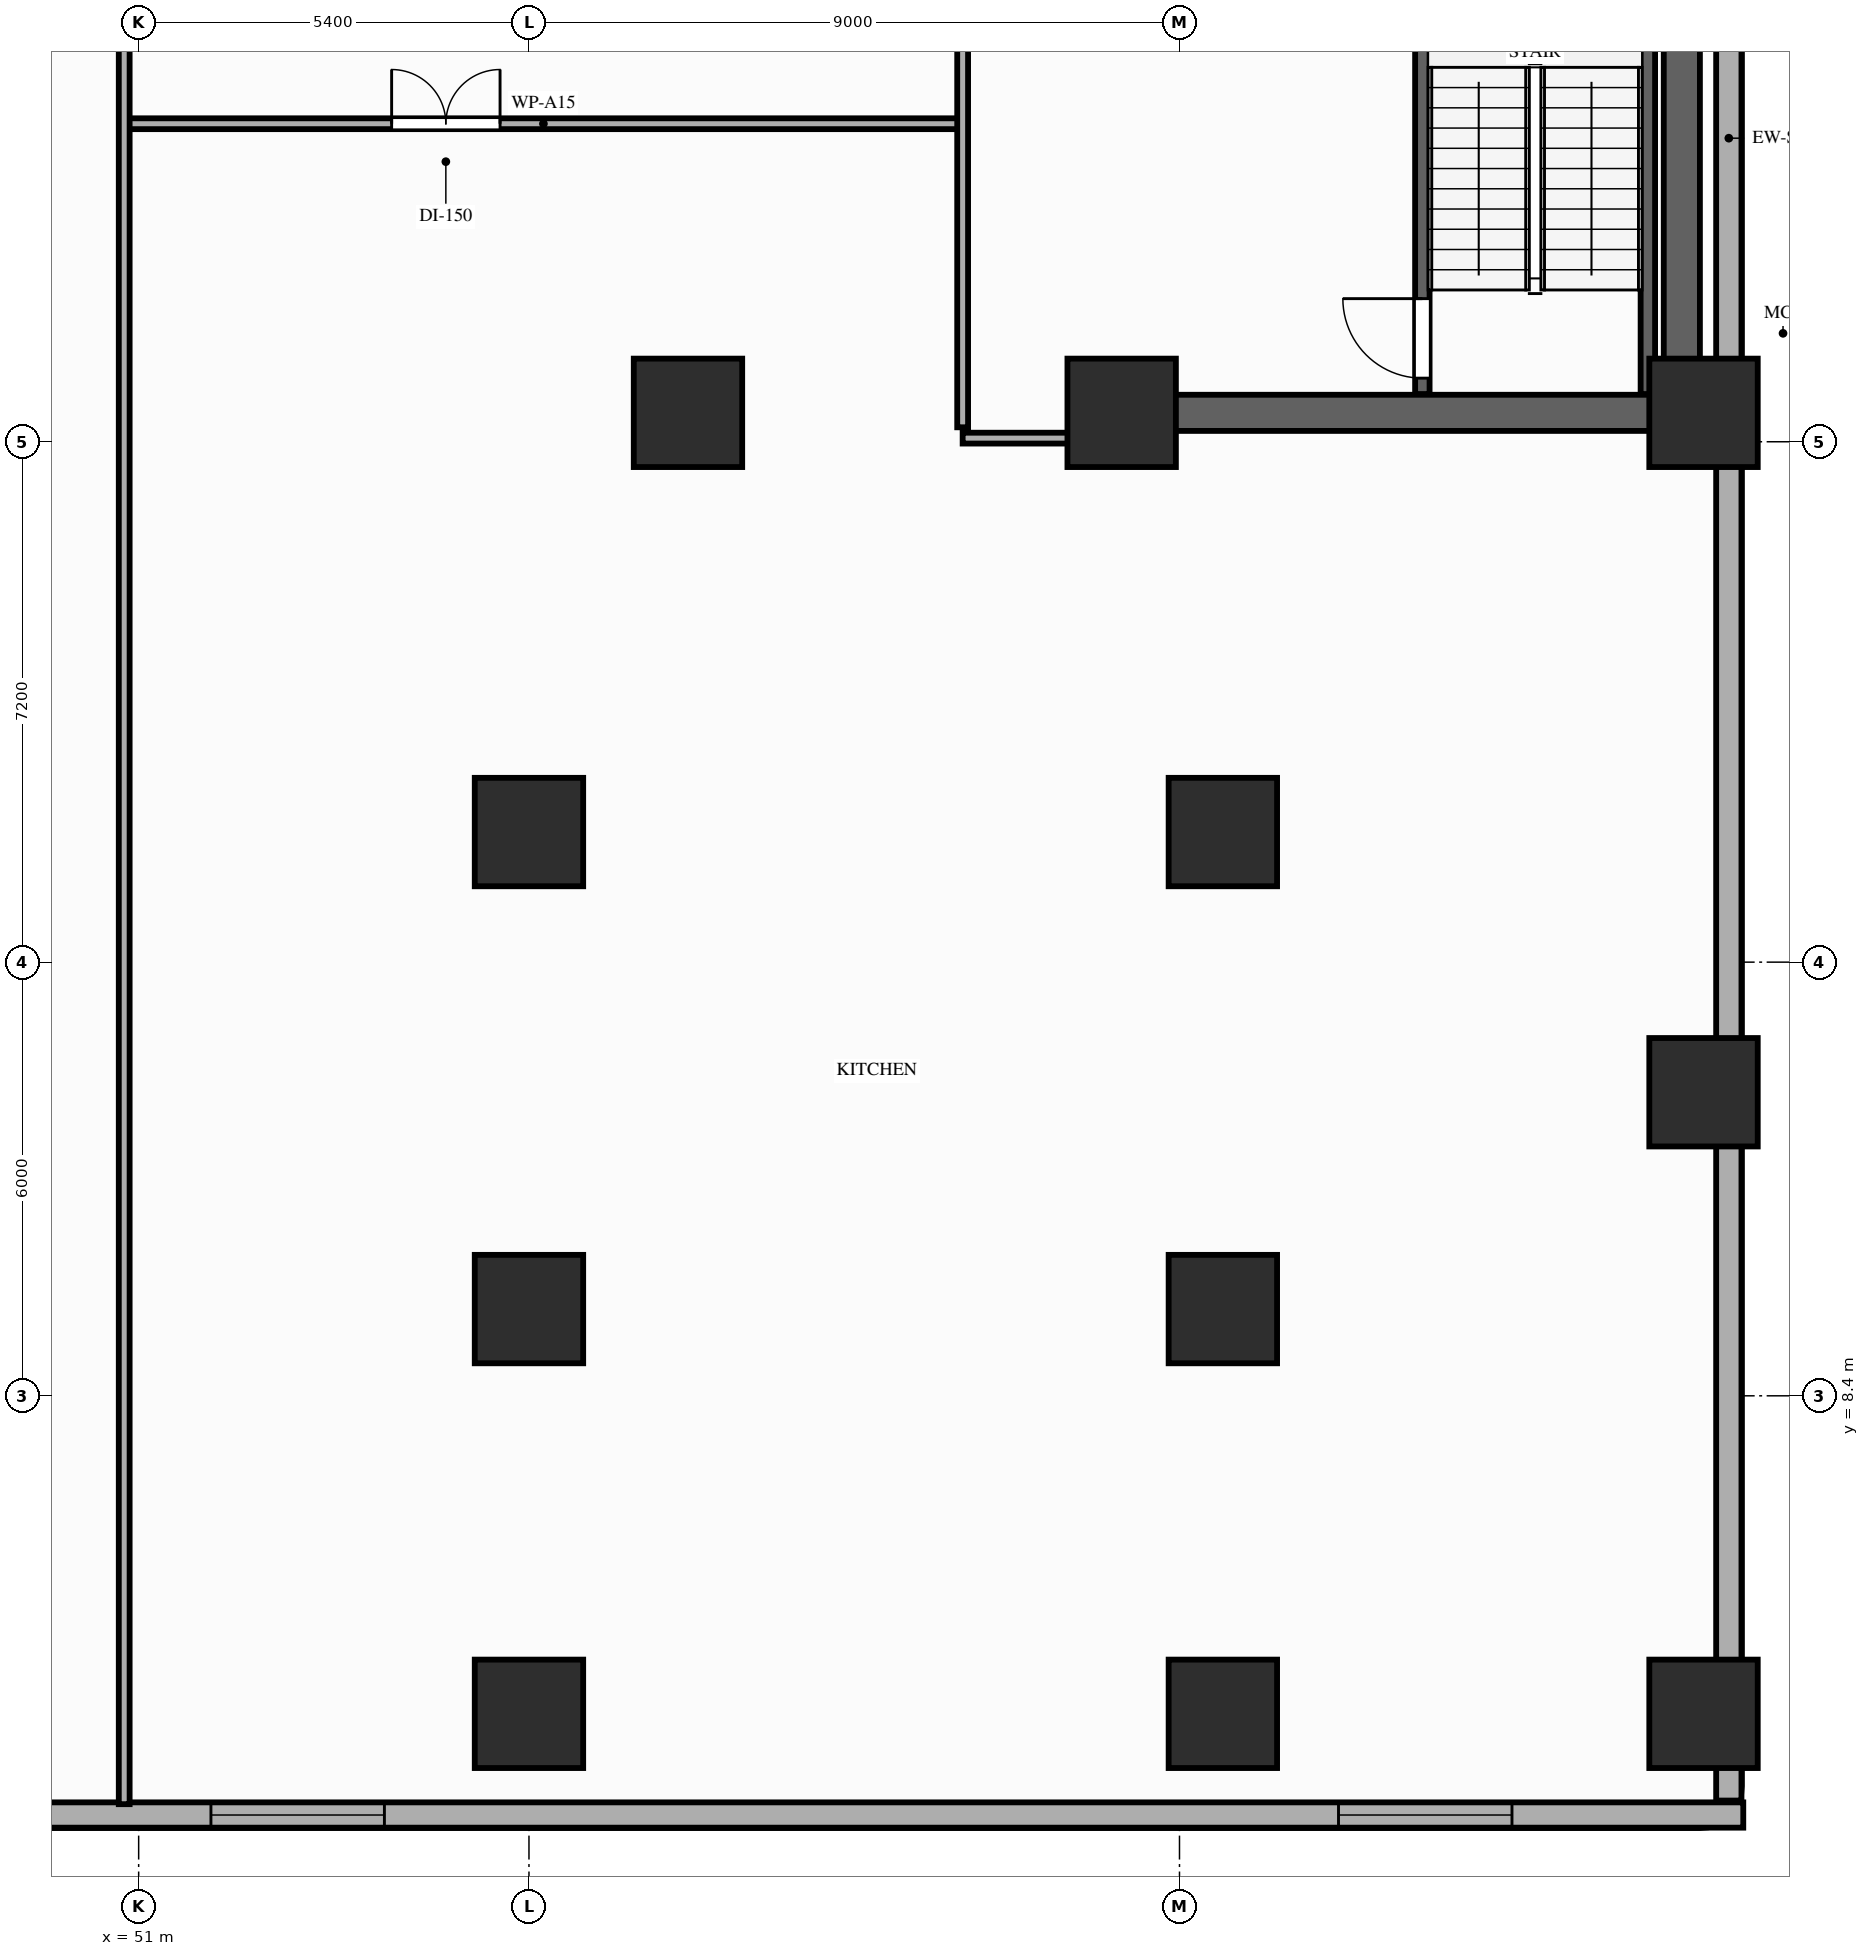
"""IFC4 building model, lengths in metres.
Left out: names, types, materials, properties, quantities, classifications, styles, units other than length and angle.
Written with IfcOpenShell. Run it as: python <this file> out.ifc"""

import sys

from ifc_helpers import new_model, si_unit, direction, frame, frame_2d, origin, origin_2d, place, context, subcontext, project, spatial, rectangle, extrude, element, fill, save


model = new_model("IFC4")
c1 = context("Model", 3, precision=1e-05, world=origin(), true_north=direction((0.0, 1.0)))
c2 = subcontext(c1, "Body", "Model", "MODEL_VIEW")
j1 = project(units=[si_unit("LENGTHUNIT", "METRE"), si_unit("PLANEANGLEUNIT", "RADIAN")], contexts=[c1])
p1 = place(None, origin())
s1 = spatial("IfcSite", under=j1, at=p1, CompositionType="ELEMENT")
p2 = place(p1, origin())
s2 = spatial("IfcBuilding", under=s1, at=p2, CompositionType="ELEMENT")
p3 = place(p2, frame((0.0, 0.0, 17.6)))
s3 = spatial("IfcBuildingStorey", under=s2, at=p3, CompositionType="ELEMENT", Elevation=17.6)
for number, where, z_axis, x_axis in (
    (1, (64.6, 22.0, 0.0), (0.0, 0.0, 1.0), (1.0, 0.0, 0.0)),
    (2, (72.65, 22.0, 0.0), (0.0, 0.0, 1.0), (1.0, 0.0, 0.0)),
    (3, (58.6, 22.0, 0.0), (0.0, 0.0, 1.0), (1.0, 0.0, 0.0)),
    (4, (56.4, 9.6, 0.0), (0.0, 0.0, 1.0), (1.0, 0.0, 0.0)),
    (5, (66.0, 9.6, 0.0), (0.0, 0.0, 1.0), (1.0, 0.0, 0.0)),
    (6, (56.4, 16.2, 0.0), (0.0, 0.0, 1.0), (1.0, 0.0, 0.0)),
    (7, (66.0, 16.2, 0.0), (0.0, 0.0, 1.0), (1.0, 0.0, 0.0)),
    (8, (56.4, 4.0, 0.0), (0.0, 0.0, 1.0), (1.0, 0.0, 0.0)),
    (9, (66.0, 4.0, 0.0), (0.0, 0.0, 1.0), (1.0, 0.0, 0.0)),
    (10, (72.65, 4.0, 0.0), (0.0, 0.0, 1.0), (1.0, 0.0, 0.0)),
    (11, (72.65, 12.6, 0.0), (0.0, 0.0, 1.0), (1.0, 0.0, 0.0)),
):
    element("IfcColumn", number, at=place(p3, frame(where, z_axis=z_axis, x_axis=x_axis)), inside=s3, PredefinedType="COLUMN", context=c2, shape_type="SweptSolid", body=[
        extrude(rectangle(XDim=1.5, YDim=1.5, at=origin_2d()), origin(), (0.0, 0.0, 1.0), 4.2),
    ])
p4 = place(p3, frame((3.6, 2.6, 0.0), z_axis=(0.0, 0.0, 1.0), x_axis=(1.0, 0.0, 0.0)))
e12 = element("IfcWall", 12, at=p4, inside=s3, PredefinedType="STANDARD", context=c2, shape_type="SweptSolid", body=[
    extrude(rectangle(XDim=69.6, YDim=0.35, at=frame_2d((34.8, 0.0))), origin(), (0.0, 0.0, 1.0), 3.9),
])
p5 = place(p4, frame((17.2, 0.0, 0.9)))
e13 = element("IfcOpeningElement", 13, at=p5, cuts=e12, PredefinedType="OPENING", context=c2, shape_type="SweptSolid", body=[
    extrude(rectangle(XDim=2.4, YDim=2.15, at=frame_2d((1.2, 1.075))), frame((0.0, 0.185, 0.0), z_axis=(0.0, -1.0, 0.0), x_axis=(1.0, 0.0, 0.0)), (0.0, 0.0, 1.0), 0.37),
])
p6 = place(p4, frame((24.6, 0.0, 0.9)))
e14 = element("IfcOpeningElement", 14, at=p6, cuts=e12, PredefinedType="OPENING", context=c2, shape_type="SweptSolid", body=[
    extrude(rectangle(XDim=2.4, YDim=2.15, at=frame_2d((1.2, 1.075))), frame((0.0, 0.185, 0.0), z_axis=(0.0, -1.0, 0.0), x_axis=(1.0, 0.0, 0.0)), (0.0, 0.0, 1.0), 0.37),
])
p7 = place(p4, frame((36.2, 0.0, 0.9)))
e15 = element("IfcOpeningElement", 15, at=p7, cuts=e12, PredefinedType="OPENING", context=c2, shape_type="SweptSolid", body=[
    extrude(rectangle(XDim=2.4, YDim=2.15, at=frame_2d((1.2, 1.075))), frame((0.0, 0.185, 0.0), z_axis=(0.0, -1.0, 0.0), x_axis=(1.0, 0.0, 0.0)), (0.0, 0.0, 1.0), 0.37),
])
p8 = place(p4, frame((48.4, 0.0, 0.9)))
e16 = element("IfcOpeningElement", 16, at=p8, cuts=e12, PredefinedType="OPENING", context=c2, shape_type="SweptSolid", body=[
    extrude(rectangle(XDim=2.4, YDim=2.15, at=frame_2d((1.2, 1.075))), frame((0.0, 0.185, 0.0), z_axis=(0.0, -1.0, 0.0), x_axis=(1.0, 0.0, 0.0)), (0.0, 0.0, 1.0), 0.37),
])
p9 = place(p4, frame((64.0, 0.0, 0.9)))
e17 = element("IfcOpeningElement", 17, at=p9, cuts=e12, PredefinedType="OPENING", context=c2, shape_type="SweptSolid", body=[
    extrude(rectangle(XDim=2.4, YDim=2.15, at=frame_2d((1.2, 1.075))), frame((0.0, 0.185, 0.0), z_axis=(0.0, -1.0, 0.0), x_axis=(1.0, 0.0, 0.0)), (0.0, 0.0, 1.0), 0.37),
])
p10 = place(p3, frame((73.0, 2.8, 0.0), z_axis=(0.0, 0.0, 1.0), x_axis=(0.0, 1.0, 0.0)))
e18 = element("IfcWall", 18, at=p10, inside=s3, PredefinedType="STANDARD", context=c2, shape_type="SweptSolid", body=[
    extrude(rectangle(XDim=46.0, YDim=0.35, at=frame_2d((23.0, 0.0))), origin(), (0.0, 0.0, 1.0), 3.9),
])
p11 = place(p3, frame((72.35, 22.0, 0.0), z_axis=(0.0, 0.0, 1.0), x_axis=(0.0, 1.0, 0.0)))
e19 = element("IfcWall", 19, at=p11, inside=s3, PredefinedType="SHEAR", context=c2, shape_type="SweptSolid", body=[
    extrude(rectangle(XDim=20.25, YDim=0.5, at=frame_2d((10.125, 0.0))), origin(), (0.0, 0.0, 1.0), 3.9),
])
p12 = place(p3, frame((64.6, 22.0, 0.0), z_axis=(0.0, 0.0, 1.0), x_axis=(1.0, 0.0, 0.0)))
e20 = element("IfcWall", 20, at=p12, inside=s3, PredefinedType="SHEAR", context=c2, shape_type="SweptSolid", body=[
    extrude(rectangle(XDim=7.5, YDim=0.5, at=frame_2d((3.75, 0.0))), origin(), (0.0, 0.0, 1.0), 3.9),
])
p13 = place(p3, frame((68.76, 22.26, 0.0), z_axis=(0.0, 0.0, 1.0), x_axis=(0.0, 1.0, 0.0)))
e21 = element("IfcWall", 21, at=p13, inside=s3, PredefinedType="SHEAR", context=c2, shape_type="SweptSolid", body=[
    extrude(rectangle(XDim=7.82, YDim=0.2, at=frame_2d((3.91, 0.0))), origin(), (0.0, 0.0, 1.0), 3.9),
])
p14 = place(p13, frame((0.22, 0.0, 0.0)))
e22 = element("IfcOpeningElement", 22, at=p14, cuts=e21, PredefinedType="OPENING", context=c2, shape_type="SweptSolid", body=[
    extrude(rectangle(XDim=1.1, YDim=2.15, at=frame_2d((0.55, 1.075))), frame((0.0, 0.11, 0.0), z_axis=(0.0, -1.0, 0.0), x_axis=(1.0, 0.0, 0.0)), (0.0, 0.0, 1.0), 0.22),
])
p15 = place(p3, frame((71.88, 22.26, 0.0), z_axis=(0.0, 0.0, 1.0), x_axis=(0.0, 1.0, 0.0)))
e23 = element("IfcWall", 23, at=p15, inside=s3, PredefinedType="SHEAR", context=c2, shape_type="SweptSolid", body=[
    extrude(rectangle(XDim=7.82, YDim=0.2, at=frame_2d((3.91, 0.0))), origin(), (0.0, 0.0, 1.0), 3.9),
])
p16 = place(p3, frame((50.8, 26.0, 0.0), z_axis=(0.0, 0.0, 1.0), x_axis=(1.0, 0.0, 0.0)))
e24 = element("IfcWall", 24, at=p16, inside=s3, PredefinedType="PARTITIONING", context=c2, shape_type="SweptSolid", body=[
    extrude(rectangle(XDim=11.6, YDim=0.15, at=frame_2d((5.8, 0.0))), origin(), (0.0, 0.0, 1.0), 3.18),
])
p17 = place(p16, frame((3.7, 0.0, 0.0)))
e25 = element("IfcOpeningElement", 25, at=p17, cuts=e24, PredefinedType="OPENING", context=c2, shape_type="SweptSolid", body=[
    extrude(rectangle(XDim=1.5, YDim=2.18, at=frame_2d((0.75, 1.09))), frame((0.0, 0.085, 0.0), z_axis=(0.0, -1.0, 0.0), x_axis=(1.0, 0.0, 0.0)), (0.0, 0.0, 1.0), 0.17),
])
p18 = place(p3, frame((50.8, 2.75, 0.0), z_axis=(0.0, 0.0, 1.0), x_axis=(0.0, 1.0, 0.0)))
e26 = element("IfcWall", 26, at=p18, inside=s3, PredefinedType="PARTITIONING", context=c2, shape_type="SweptSolid", body=[
    extrude(rectangle(XDim=24.85, YDim=0.15, at=frame_2d((12.425, 0.0))), origin(), (0.0, 0.0, 1.0), 3.9),
])
p19 = place(p3, frame((62.4, 21.8, 0.0), z_axis=(0.0, 0.0, 1.0), x_axis=(0.0, 1.0, 0.0)))
e27 = element("IfcWall", 27, at=p19, inside=s3, PredefinedType="PARTITIONING", context=c2, shape_type="SweptSolid", body=[
    extrude(rectangle(XDim=27.05, YDim=0.15, at=frame_2d((13.525, 0.0))), origin(), (0.0, 0.0, 1.0), 3.18),
])
p20 = place(p19, frame((6.2, 0.0, 0.0)))
e28 = element("IfcOpeningElement", 28, at=p20, cuts=e27, PredefinedType="OPENING", context=c2, shape_type="SweptSolid", body=[
    extrude(rectangle(XDim=1.1, YDim=2.15, at=frame_2d((0.55, 1.075))), frame((0.0, 0.085, 0.0), z_axis=(0.0, -1.0, 0.0), x_axis=(1.0, 0.0, 0.0)), (0.0, 0.0, 1.0), 0.17),
])
p21 = place(p3, frame((62.4, 21.65, 0.0), z_axis=(0.0, 0.0, 1.0), x_axis=(1.0, 0.0, 0.0)))
e29 = element("IfcWall", 29, at=p21, inside=s3, PredefinedType="PARTITIONING", context=c2, shape_type="SweptSolid", body=[
    extrude(rectangle(XDim=2.05, YDim=0.15, at=frame_2d((1.025, 0.0))), origin(), (0.0, 0.0, 1.0), 3.18),
])
p22 = place(p8, origin())
e30 = element("IfcWindow", 30, at=p22, inside=s3, PartitioningType="SINGLE_PANEL", PredefinedType="WINDOW", context=c2, shape_type="SweptSolid", body=[
    extrude(rectangle(XDim=2.4, YDim=2.15, at=frame_2d((1.2, 1.075))), frame((0.0, 0.03, 0.0), z_axis=(0.0, -1.0, 0.0), x_axis=(1.0, 0.0, 0.0)), (0.0, 0.0, 1.0), 0.06),
])
fill(e16, e30)
p23 = place(p9, origin())
e31 = element("IfcWindow", 31, at=p23, inside=s3, PartitioningType="SINGLE_PANEL", PredefinedType="WINDOW", context=c2, shape_type="SweptSolid", body=[
    extrude(rectangle(XDim=2.4, YDim=2.15, at=frame_2d((1.2, 1.075))), frame((0.0, 0.03, 0.0), z_axis=(0.0, -1.0, 0.0), x_axis=(1.0, 0.0, 0.0)), (0.0, 0.0, 1.0), 0.06),
])
fill(e17, e31)
p24 = place(p14, origin())
e32 = element("IfcDoor", 32, at=p24, inside=s3, OperationType="SINGLE_SWING_RIGHT", PredefinedType="DOOR", context=c2, shape_type="SweptSolid", body=[
    extrude(rectangle(XDim=1.1, YDim=2.15, at=frame_2d((0.55, 1.075))), frame((0.0, 0.025, 0.0), z_axis=(0.0, -1.0, 0.0), x_axis=(1.0, 0.0, 0.0)), (0.0, 0.0, 1.0), 0.05),
])
fill(e22, e32)
p25 = place(p17, origin())
e33 = element("IfcDoor", 33, at=p25, inside=s3, OperationType="DOUBLE_DOOR_SINGLE_SWING", PredefinedType="DOOR", context=c2, shape_type="SweptSolid", body=[
    extrude(rectangle(XDim=1.5, YDim=2.18, at=frame_2d((0.75, 1.09))), frame((0.0, 0.025, 0.0), z_axis=(0.0, -1.0, 0.0), x_axis=(1.0, 0.0, 0.0)), (0.0, 0.0, 1.0), 0.05),
])
fill(e25, e33)
save(model, sys.argv[1])
